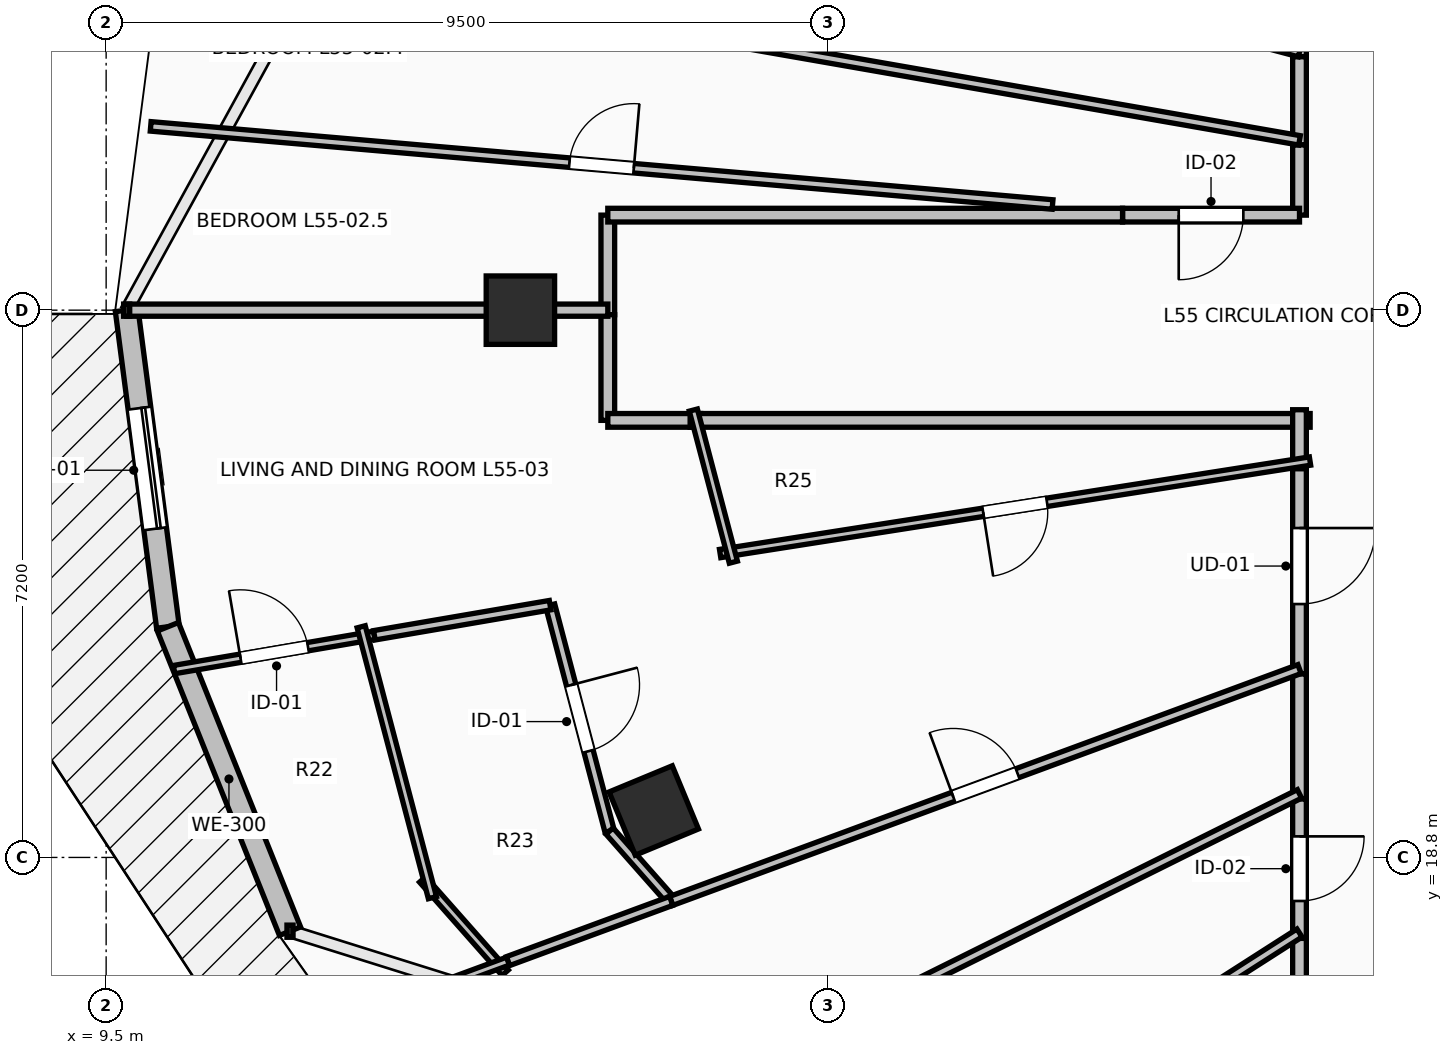
"""IFC4 building model, lengths in metres.
Left out: names, types, materials, properties, quantities, classifications, styles, units other than length and angle.
Written with IfcOpenShell. Run it as: python <this file> out.ifc"""

import sys

from ifc_helpers import new_model, si_unit, direction, frame, frame_2d, origin, origin_2d, place, context, subcontext, project, spatial, rectangle, extrude, element, fill, save


model = new_model("IFC4")
c1 = context("Model", 3, precision=1e-05, world=origin(), true_north=direction((0.0, 1.0)))
c2 = subcontext(c1, "Body", "Model", "MODEL_VIEW")
j1 = project(units=[si_unit("LENGTHUNIT", "METRE"), si_unit("PLANEANGLEUNIT", "RADIAN")], contexts=[c1])
p1 = place(None, origin())
s1 = spatial("IfcSite", under=j1, at=p1, CompositionType="ELEMENT")
p2 = place(p1, origin())
s2 = spatial("IfcBuilding", under=s1, at=p2, CompositionType="ELEMENT")
p3 = place(p2, frame((0.0, 0.0, 203.65)))
s3 = spatial("IfcBuildingStorey", under=s2, at=p3, CompositionType="ELEMENT", Elevation=203.65)
for number, where, z_axis, x_axis in (
    (1, (14.95, 26.0, 0.0), (0.0, 0.0, 1.0), (-1.0, 0.0, 0.0)),
    (2, (16.705, 19.418, 0.0), (0.0, 0.0, 1.0), (-0.924, -0.383, 0.0)),
):
    element("IfcColumn", number, at=place(p3, frame(where, z_axis=z_axis, x_axis=x_axis)), inside=s3, PredefinedType="COLUMN", context=c2, shape_type="SweptSolid", body=[
        extrude(rectangle(XDim=0.9, YDim=0.9, at=origin_2d()), origin(), (0.0, 0.0, 1.0), 3.55),
    ])
p4 = place(p3, frame((9.77, 26.0, 0.0), z_axis=(0.0, 0.0, 1.0), x_axis=(0.129147853268, -0.991625348605, 0.0)))
e3 = element("IfcWall", 3, at=p4, inside=s3, PredefinedType="STANDARD", context=c2, shape_type="SweptSolid", body=[
    extrude(rectangle(XDim=4.2, YDim=0.3, at=frame_2d((2.1, 0.0))), origin(), (0.0, 0.0, 1.0), 3.29),
])
p5 = place(p4, frame((1.3, 0.0, 0.0)))
e4 = element("IfcOpeningElement", 4, at=p5, cuts=e3, PredefinedType="OPENING", context=c2, shape_type="SweptSolid", body=[
    extrude(rectangle(XDim=1.6, YDim=2.3, at=frame_2d((0.8, 1.15))), frame((0.0, 0.165, 0.0), z_axis=(0.0, -1.0, 0.0), x_axis=(1.0, 0.0, 0.0)), (0.0, 0.0, 1.0), 0.33),
])
p6 = place(p3, frame((10.312, 21.835, 0.0), z_axis=(0.0, 0.0, 1.0), x_axis=(0.372268409848, -0.928125116043, 0.0)))
e5 = element("IfcWall", 5, at=p6, inside=s3, PredefinedType="STANDARD", context=c2, shape_type="SweptSolid", body=[
    extrude(rectangle(XDim=4.315, YDim=0.3, at=frame_2d((2.158, 0.0))), origin(), (0.0, 0.0, 1.0), 3.29),
])
p7 = place(p3, frame((25.2, 30.548, 0.0), z_axis=(0.0, 0.0, 1.0), x_axis=(0.0, -1.0, 0.0)))
e6 = element("IfcWall", 6, at=p7, inside=s3, PredefinedType="PARTITIONING", context=c2, shape_type="SweptSolid", body=[
    extrude(rectangle(XDim=1.214, YDim=0.18, at=frame_2d((0.607, 0.0))), origin(), (0.0, 0.0, 1.0), 2.482),
])
p8 = place(p3, frame((25.2, 29.334, 0.0), z_axis=(0.0, 0.0, 1.0), x_axis=(0.0, -1.0, 0.0)))
e7 = element("IfcWall", 7, at=p8, inside=s3, PredefinedType="PARTITIONING", context=c2, shape_type="SweptSolid", body=[
    extrude(rectangle(XDim=1.16, YDim=0.18, at=frame_2d((0.58, 0.0))), origin(), (0.0, 0.0, 1.0), 2.482),
])
p9 = place(p3, frame((25.2, 28.174, 0.0), z_axis=(0.0, 0.0, 1.0), x_axis=(0.0, -1.0, 0.0)))
e8 = element("IfcWall", 8, at=p9, inside=s3, PredefinedType="PARTITIONING", context=c2, shape_type="SweptSolid", body=[
    extrude(rectangle(XDim=0.924, YDim=0.18, at=frame_2d((0.462, 0.0))), origin(), (0.0, 0.0, 1.0), 2.482),
])
p10 = place(p3, frame((25.2, 27.25, 0.0), z_axis=(0.0, 0.0, 1.0), x_axis=(-1.0, 0.0, 0.0)))
e9 = element("IfcWall", 9, at=p10, inside=s3, PredefinedType="PARTITIONING", context=c2, shape_type="SweptSolid", body=[
    extrude(rectangle(XDim=2.328, YDim=0.18, at=frame_2d((1.164, 0.0))), origin(), (0.0, 0.0, 1.0), 2.482),
])
p11 = place(p10, frame((0.739, 0.0, 0.0)))
e10 = element("IfcOpeningElement", 10, at=p11, cuts=e9, PredefinedType="OPENING", context=c2, shape_type="SweptSolid", body=[
    extrude(rectangle(XDim=0.85, YDim=2.1, at=frame_2d((0.425, 1.05))), frame((0.0, 0.105, 0.0), z_axis=(0.0, -1.0, 0.0), x_axis=(1.0, 0.0, 0.0)), (0.0, 0.0, 1.0), 0.21),
])
p12 = place(p3, frame((16.1, 27.25, 0.0), z_axis=(0.0, 0.0, 1.0), x_axis=(0.0, -1.0, 0.0)))
e11 = element("IfcWall", 11, at=p12, inside=s3, PredefinedType="PARTITIONING", context=c2, shape_type="SweptSolid", body=[
    extrude(rectangle(XDim=1.31, YDim=0.18, at=frame_2d((0.655, 0.0))), origin(), (0.0, 0.0, 1.0), 2.482),
])
p13 = place(p3, frame((22.872, 27.25, 0.0), z_axis=(0.0, 0.0, 1.0), x_axis=(-1.0, 0.0, 0.0)))
e12 = element("IfcWall", 12, at=p13, inside=s3, PredefinedType="PARTITIONING", context=c2, shape_type="SweptSolid", body=[
    extrude(rectangle(XDim=6.772, YDim=0.18, at=frame_2d((3.386, 0.0))), origin(), (0.0, 0.0, 1.0), 2.482),
])
p14 = place(p3, frame((16.1, 25.94, 0.0), z_axis=(0.0, 0.0, 1.0), x_axis=(0.0, -1.0, 0.0)))
e13 = element("IfcWall", 13, at=p14, inside=s3, PredefinedType="PARTITIONING", context=c2, shape_type="SweptSolid", body=[
    extrude(rectangle(XDim=1.39, YDim=0.18, at=frame_2d((0.695, 0.0))), origin(), (0.0, 0.0, 1.0), 2.482),
])
p15 = place(p3, frame((16.1, 24.55, 0.0), z_axis=(0.0, 0.0, 1.0), x_axis=(1.0, 0.0, 0.0)))
e14 = element("IfcWall", 14, at=p15, inside=s3, PredefinedType="PARTITIONING", context=c2, shape_type="SweptSolid", body=[
    extrude(rectangle(XDim=1.223, YDim=0.18, at=frame_2d((0.611, 0.0))), origin(), (0.0, 0.0, 1.0), 3.29),
])
p16 = place(p3, frame((25.2, 24.053, 0.0), z_axis=(0.0, 0.0, 1.0), x_axis=(0.0, -1.0, 0.0)))
e15 = element("IfcWall", 15, at=p16, inside=s3, PredefinedType="PARTITIONING", context=c2, shape_type="SweptSolid", body=[
    extrude(rectangle(XDim=2.839, YDim=0.18, at=frame_2d((1.419, 0.0))), origin(), (0.0, 0.0, 1.0), 3.29),
])
p17 = place(p16, frame((0.919, 0.0, 0.0)))
e16 = element("IfcOpeningElement", 16, at=p17, cuts=e15, PredefinedType="OPENING", context=c2, shape_type="SweptSolid", body=[
    extrude(rectangle(XDim=1.0, YDim=2.15, at=frame_2d((0.5, 1.075))), frame((0.0, 0.105, 0.0), z_axis=(0.0, -1.0, 0.0), x_axis=(1.0, 0.0, 0.0)), (0.0, 0.0, 1.0), 0.21),
])
p18 = place(p3, frame((17.183, 24.55, 0.0), z_axis=(0.0, 0.0, 1.0), x_axis=(1.0, 0.0, 0.0)))
e17 = element("IfcWall", 17, at=p18, inside=s3, PredefinedType="PARTITIONING", context=c2, shape_type="SweptSolid", body=[
    extrude(rectangle(XDim=8.157, YDim=0.18, at=frame_2d((4.079, 0.0))), origin(), (0.0, 0.0, 1.0), 2.936),
])
p19 = place(p3, frame((25.2, 24.69, 0.0), z_axis=(0.0, 0.0, 1.0), x_axis=(0.0, -1.0, 0.0)))
e18 = element("IfcWall", 18, at=p19, inside=s3, PredefinedType="PARTITIONING", context=c2, shape_type="SweptSolid", body=[
    extrude(rectangle(XDim=0.777, YDim=0.18, at=frame_2d((0.388, 0.0))), origin(), (0.0, 0.0, 1.0), 3.29),
])
p20 = place(p3, frame((25.2, 21.214, 0.0), z_axis=(0.0, 0.0, 1.0), x_axis=(0.0, -1.0, 0.0)))
e19 = element("IfcWall", 19, at=p20, inside=s3, PredefinedType="PARTITIONING", context=c2, shape_type="SweptSolid", body=[
    extrude(rectangle(XDim=1.645, YDim=0.18, at=frame_2d((0.823, 0.0))), origin(), (0.0, 0.0, 1.0), 3.29),
])
p21 = place(p3, frame((25.2, 19.569, 0.0), z_axis=(0.0, 0.0, 1.0), x_axis=(0.0, -1.0, 0.0)))
e20 = element("IfcWall", 20, at=p21, inside=s3, PredefinedType="PARTITIONING", context=c2, shape_type="SweptSolid", body=[
    extrude(rectangle(XDim=1.834, YDim=0.18, at=frame_2d((0.917, 0.0))), origin(), (0.0, 0.0, 1.0), 3.29),
])
p22 = place(p21, frame((0.492, 0.0, 0.0)))
e21 = element("IfcOpeningElement", 21, at=p22, cuts=e20, PredefinedType="OPENING", context=c2, shape_type="SweptSolid", body=[
    extrude(rectangle(XDim=0.85, YDim=2.1, at=frame_2d((0.425, 1.05))), frame((0.0, 0.105, 0.0), z_axis=(0.0, -1.0, 0.0), x_axis=(1.0, 0.0, 0.0)), (0.0, 0.0, 1.0), 0.21),
])
p23 = place(p3, frame((25.2, 17.735, 0.0), z_axis=(0.0, 0.0, 1.0), x_axis=(0.0, -1.0, 0.0)))
e22 = element("IfcWall", 22, at=p23, inside=s3, PredefinedType="PARTITIONING", context=c2, shape_type="SweptSolid", body=[
    extrude(rectangle(XDim=2.108, YDim=0.18, at=frame_2d((1.054, 0.0))), origin(), (0.0, 0.0, 1.0), 2.482),
])
p24 = place(p23, frame((0.629, 0.0, 0.0)))
e23 = element("IfcOpeningElement", 23, at=p24, cuts=e22, PredefinedType="OPENING", context=c2, shape_type="SweptSolid", body=[
    extrude(rectangle(XDim=0.85, YDim=2.1, at=frame_2d((0.425, 1.05))), frame((0.0, 0.105, 0.0), z_axis=(0.0, -1.0, 0.0), x_axis=(1.0, 0.0, 0.0)), (0.0, 0.0, 1.0), 0.21),
])
p25 = place(p3, frame((11.465, 33.036, 0.0), z_axis=(0.0, 0.0, 1.0), x_axis=(0.966598137313, -0.256296782934, 0.0)))
e24 = element("IfcWall", 24, at=p25, inside=s3, PredefinedType="PARTITIONING", context=c2, shape_type="SweptSolid", body=[
    extrude(rectangle(XDim=14.209, YDim=0.125, at=frame_2d((7.105, 0.0))), origin(), (0.0, 0.0, 1.0), 2.482),
])
p26 = place(p25, frame((6.68, 0.0, 0.0)))
e25 = element("IfcOpeningElement", 25, at=p26, cuts=e24, PredefinedType="OPENING", context=c2, shape_type="SweptSolid", body=[
    extrude(rectangle(XDim=0.85, YDim=2.1, at=frame_2d((0.425, 1.05))), frame((0.0, 0.077, 0.0), z_axis=(0.0, -1.0, 0.0), x_axis=(1.0, 0.0, 0.0)), (0.0, 0.0, 1.0), 0.155),
])
p27 = place(p3, frame((10.565, 30.788, 0.0), z_axis=(0.0, 0.0, 1.0), x_axis=(0.985109541297, -0.171927867563, 0.0)))
e26 = element("IfcWall", 26, at=p27, inside=s3, PredefinedType="PARTITIONING", context=c2, shape_type="SweptSolid", body=[
    extrude(rectangle(XDim=14.856, YDim=0.125, at=frame_2d((7.428, 0.0))), origin(), (0.0, 0.0, 1.0), 2.824),
])
p28 = place(p3, frame((10.086, 28.418, 0.0), z_axis=(0.0, 0.0, 1.0), x_axis=(0.996267232338, -0.08632266081, 0.0)))
e27 = element("IfcWall", 27, at=p28, inside=s3, PredefinedType="PARTITIONING", context=c2, shape_type="SweptSolid", body=[
    extrude(rectangle(XDim=11.91, YDim=0.125, at=frame_2d((5.955, 0.0))), origin(), (0.0, 0.0, 1.0), 2.482),
])
p29 = place(p28, frame((5.53, 0.0, 0.0)))
e28 = element("IfcOpeningElement", 28, at=p29, cuts=e27, PredefinedType="OPENING", context=c2, shape_type="SweptSolid", body=[
    extrude(rectangle(XDim=0.85, YDim=2.1, at=frame_2d((0.425, 1.05))), frame((0.0, 0.077, 0.0), z_axis=(0.0, -1.0, 0.0), x_axis=(1.0, 0.0, 0.0)), (0.0, 0.0, 1.0), 0.155),
])
p30 = place(p3, frame((9.771, 26.0, 0.0), z_axis=(0.0, 0.0, 1.0), x_axis=(1.0, 0.0, 0.0)))
e29 = element("IfcWall", 29, at=p30, inside=s3, PredefinedType="PARTITIONING", context=c2, shape_type="SweptSolid", body=[
    extrude(rectangle(XDim=6.329, YDim=0.16, at=frame_2d((3.165, 0.0))), origin(), (0.0, 0.0, 1.0), 2.482),
])
p31 = place(p3, frame((25.338, 24.015, 0.0), z_axis=(0.0, 0.0, 1.0), x_axis=(-0.987940229144, -0.154835731144, 0.0)))
e30 = element("IfcWall", 30, at=p31, inside=s3, PredefinedType="PARTITIONING", context=c2, shape_type="SweptSolid", body=[
    extrude(rectangle(XDim=7.855, YDim=0.11, at=frame_2d((3.928, 0.0))), origin(), (0.0, 0.0, 1.0), 2.936),
])
p32 = place(p31, frame((3.503, 0.0, 0.0)))
e31 = element("IfcOpeningElement", 31, at=p32, cuts=e30, PredefinedType="OPENING", context=c2, shape_type="SweptSolid", body=[
    extrude(rectangle(XDim=0.85, YDim=2.1, at=frame_2d((0.425, 1.05))), frame((0.0, 0.07, 0.0), z_axis=(0.0, -1.0, 0.0), x_axis=(1.0, 0.0, 0.0)), (0.0, 0.0, 1.0), 0.14),
])
p33 = place(p3, frame((17.752, 22.685, 0.0), z_axis=(0.0, 0.0, 1.0), x_axis=(-0.254429402158, 0.967091350038, 0.0)))
e32 = element("IfcWall", 32, at=p33, inside=s3, PredefinedType="PARTITIONING", context=c2, shape_type="SweptSolid", body=[
    extrude(rectangle(XDim=2.069, YDim=0.11, at=frame_2d((1.034, 0.0))), origin(), (0.0, 0.0, 1.0), 3.29),
])
p34 = place(p3, frame((10.394, 21.271, 0.0), z_axis=(0.0, 0.0, 1.0), x_axis=(0.985656128296, 0.168766100722, 0.0)))
e33 = element("IfcWall", 33, at=p34, inside=s3, PredefinedType="PARTITIONING", context=c2, shape_type="SweptSolid", body=[
    extrude(rectangle(XDim=2.673, YDim=0.11, at=frame_2d((1.337, 0.0))), origin(), (0.0, 0.0, 1.0), 3.29),
])
p35 = place(p34, frame((0.887, 0.0, 0.0)))
e34 = element("IfcOpeningElement", 34, at=p35, cuts=e33, PredefinedType="OPENING", context=c2, shape_type="SweptSolid", body=[
    extrude(rectangle(XDim=0.9, YDim=2.1, at=frame_2d((0.45, 1.05))), frame((0.0, 0.07, 0.0), z_axis=(0.0, -1.0, 0.0), x_axis=(1.0, 0.0, 0.0)), (0.0, 0.0, 1.0), 0.14),
])
p36 = place(p3, frame((15.341, 22.119, 0.0), z_axis=(0.0, 0.0, 1.0), x_axis=(0.254462015144, -0.967082769389, 0.0)))
e35 = element("IfcWall", 35, at=p36, inside=s3, PredefinedType="PARTITIONING", context=c2, shape_type="SweptSolid", body=[
    extrude(rectangle(XDim=3.073, YDim=0.125, at=frame_2d((1.537, 0.0))), origin(), (0.0, 0.0, 1.0), 3.29),
])
p37 = place(p36, frame((1.087, 0.0, 0.0)))
e36 = element("IfcOpeningElement", 36, at=p37, cuts=e35, PredefinedType="OPENING", context=c2, shape_type="SweptSolid", body=[
    extrude(rectangle(XDim=0.9, YDim=2.1, at=frame_2d((0.45, 1.05))), frame((0.0, 0.077, 0.0), z_axis=(0.0, -1.0, 0.0), x_axis=(1.0, 0.0, 0.0)), (0.0, 0.0, 1.0), 0.155),
])
p38 = place(p3, frame((16.123, 19.147, 0.0), z_axis=(0.0, 0.0, 1.0), x_axis=(0.66171386468, -0.749756467988, 0.0)))
e37 = element("IfcWall", 37, at=p38, inside=s3, PredefinedType="PARTITIONING", context=c2, shape_type="SweptSolid", body=[
    extrude(rectangle(XDim=1.226, YDim=0.125, at=frame_2d((0.613, 0.0))), origin(), (0.0, 0.0, 1.0), 3.29),
])
p39 = place(p3, frame((13.029, 21.723, 0.0), z_axis=(0.0, 0.0, 1.0), x_axis=(0.985629682191, 0.16892048302, 0.0)))
e38 = element("IfcWall", 38, at=p39, inside=s3, PredefinedType="PARTITIONING", context=c2, shape_type="SweptSolid", body=[
    extrude(rectangle(XDim=2.346, YDim=0.125, at=frame_2d((1.173, 0.0))), origin(), (0.0, 0.0, 1.0), 3.29),
])
p40 = place(p3, frame((16.934, 18.228, 0.0), z_axis=(0.0, 0.0, 1.0), x_axis=(0.938168899516, 0.34617786755, 0.0)))
e39 = element("IfcWall", 39, at=p40, inside=s3, PredefinedType="PARTITIONING", context=c2, shape_type="SweptSolid", body=[
    extrude(rectangle(XDim=8.811, YDim=0.125, at=frame_2d((4.405, 0.0))), origin(), (0.0, 0.0, 1.0), 2.482),
])
p41 = place(p40, frame((3.955, 0.0, 0.0)))
e40 = element("IfcOpeningElement", 40, at=p41, cuts=e39, PredefinedType="OPENING", context=c2, shape_type="SweptSolid", body=[
    extrude(rectangle(XDim=0.9, YDim=2.1, at=frame_2d((0.45, 1.05))), frame((0.0, 0.077, 0.0), z_axis=(0.0, -1.0, 0.0), x_axis=(1.0, 0.0, 0.0)), (0.0, 0.0, 1.0), 0.155),
])
p42 = place(p3, frame((14.75, 17.283, 0.0), z_axis=(0.0, 0.0, 1.0), x_axis=(-0.662345628205, 0.749198417509, 0.0)))
e41 = element("IfcWall", 41, at=p42, inside=s3, PredefinedType="PARTITIONING", context=c2, shape_type="SweptSolid", body=[
    extrude(rectangle(XDim=1.639, YDim=0.11, at=frame_2d((0.819, 0.0))), origin(), (0.0, 0.0, 1.0), 3.29),
])
p43 = place(p3, frame((13.792, 18.271, 0.0), z_axis=(0.0, 0.0, 1.0), x_axis=(-0.254271540361, 0.967132867688, 0.0)))
e42 = element("IfcWall", 42, at=p43, inside=s3, PredefinedType="PARTITIONING", context=c2, shape_type="SweptSolid", body=[
    extrude(rectangle(XDim=3.685, YDim=0.11, at=frame_2d((1.843, 0.0))), origin(), (0.0, 0.0, 1.0), 3.29),
])
p44 = place(p3, frame((12.604, 16.631, 0.0), z_axis=(0.0, 0.0, 1.0), x_axis=(0.938194450562, 0.346108614361, 0.0)))
e43 = element("IfcWall", 43, at=p44, inside=s3, PredefinedType="PARTITIONING", context=c2, shape_type="SweptSolid", body=[
    extrude(rectangle(XDim=2.328, YDim=0.11, at=frame_2d((1.164, 0.0))), origin(), (0.0, 0.0, 1.0), 3.29),
])
p45 = place(p3, frame((14.788, 17.436, 0.0), z_axis=(0.0, 0.0, 1.0), x_axis=(0.938171690747, 0.346170303003, 0.0)))
e44 = element("IfcWall", 44, at=p45, inside=s3, PredefinedType="PARTITIONING", context=c2, shape_type="SweptSolid", body=[
    extrude(rectangle(XDim=2.287, YDim=0.125, at=frame_2d((1.144, 0.0))), origin(), (0.0, 0.0, 1.0), 3.29),
])
p46 = place(p3, frame((14.428, 14.28, 0.0), z_axis=(0.0, 0.0, 1.0), x_axis=(0.895423439435, 0.44521552546, 0.0)))
e45 = element("IfcWall", 45, at=p46, inside=s3, PredefinedType="PARTITIONING", context=c2, shape_type="SweptSolid", body=[
    extrude(rectangle(XDim=12.03, YDim=0.125, at=frame_2d((6.015, 0.0))), origin(), (0.0, 0.0, 1.0), 2.482),
])
p47 = place(p3, frame((16.555, 12.272, 0.0), z_axis=(0.0, 0.0, 1.0), x_axis=(0.842221721565, 0.539131312135, 0.0)))
e46 = element("IfcWall", 46, at=p47, inside=s3, PredefinedType="PARTITIONING", context=c2, shape_type="SweptSolid", body=[
    extrude(rectangle(XDim=10.265, YDim=0.125, at=frame_2d((5.132, 0.0))), origin(), (0.0, 0.0, 1.0), 2.482),
])
p48 = place(p5, origin())
e47 = element("IfcDoor", 47, at=p48, inside=s3, OperationType="SLIDING_TO_LEFT", PredefinedType="DOOR", context=c2, shape_type="SweptSolid", body=[
    extrude(rectangle(XDim=1.6, YDim=2.3, at=frame_2d((0.8, 1.15))), frame((0.0, 0.025, 0.0), z_axis=(0.0, -1.0, 0.0), x_axis=(1.0, 0.0, 0.0)), (0.0, 0.0, 1.0), 0.05),
])
fill(e4, e47)
p49 = place(p17, origin())
e48 = element("IfcDoor", 48, at=p49, inside=s3, OperationType="SINGLE_SWING_LEFT", PredefinedType="DOOR", context=c2, shape_type="SweptSolid", body=[
    extrude(rectangle(XDim=1.0, YDim=2.15, at=frame_2d((0.5, 1.075))), frame((0.0, 0.025, 0.0), z_axis=(0.0, -1.0, 0.0), x_axis=(1.0, 0.0, 0.0)), (0.0, 0.0, 1.0), 0.05),
])
fill(e16, e48)
p50 = place(p32, origin())
e49 = element("IfcDoor", 49, at=p50, inside=s3, OperationType="SINGLE_SWING_RIGHT", PredefinedType="DOOR", context=c2, shape_type="SweptSolid", body=[
    extrude(rectangle(XDim=0.85, YDim=2.1, at=frame_2d((0.425, 1.05))), frame((0.0, 0.025, 0.0), z_axis=(0.0, -1.0, 0.0), x_axis=(1.0, 0.0, 0.0)), (0.0, 0.0, 1.0), 0.05),
])
fill(e31, e49)
p51 = place(p35, origin())
e50 = element("IfcDoor", 50, at=p51, inside=s3, OperationType="SINGLE_SWING_LEFT", PredefinedType="DOOR", context=c2, shape_type="SweptSolid", body=[
    extrude(rectangle(XDim=0.9, YDim=2.1, at=frame_2d((0.45, 1.05))), frame((0.0, 0.025, 0.0), z_axis=(0.0, -1.0, 0.0), x_axis=(1.0, 0.0, 0.0)), (0.0, 0.0, 1.0), 0.05),
])
fill(e34, e50)
p52 = place(p37, origin())
e51 = element("IfcDoor", 51, at=p52, inside=s3, OperationType="SINGLE_SWING_LEFT", PredefinedType="DOOR", context=c2, shape_type="SweptSolid", body=[
    extrude(rectangle(XDim=0.9, YDim=2.1, at=frame_2d((0.45, 1.05))), frame((0.0, 0.025, 0.0), z_axis=(0.0, -1.0, 0.0), x_axis=(1.0, 0.0, 0.0)), (0.0, 0.0, 1.0), 0.05),
])
fill(e36, e51)
p53 = place(p41, origin())
e52 = element("IfcDoor", 52, at=p53, inside=s3, OperationType="SINGLE_SWING_LEFT", PredefinedType="DOOR", context=c2, shape_type="SweptSolid", body=[
    extrude(rectangle(XDim=0.9, YDim=2.1, at=frame_2d((0.45, 1.05))), frame((0.0, 0.025, 0.0), z_axis=(0.0, -1.0, 0.0), x_axis=(1.0, 0.0, 0.0)), (0.0, 0.0, 1.0), 0.05),
])
fill(e40, e52)
p54 = place(p11, origin())
e53 = element("IfcDoor", 53, at=p54, inside=s3, OperationType="SINGLE_SWING_RIGHT", PredefinedType="DOOR", context=c2, shape_type="SweptSolid", body=[
    extrude(rectangle(XDim=0.85, YDim=2.1, at=frame_2d((0.425, 1.05))), frame((0.0, 0.025, 0.0), z_axis=(0.0, -1.0, 0.0), x_axis=(1.0, 0.0, 0.0)), (0.0, 0.0, 1.0), 0.05),
])
fill(e10, e53)
p55 = place(p22, origin())
e54 = element("IfcDoor", 54, at=p55, inside=s3, OperationType="SINGLE_SWING_LEFT", PredefinedType="DOOR", context=c2, shape_type="SweptSolid", body=[
    extrude(rectangle(XDim=0.85, YDim=2.1, at=frame_2d((0.425, 1.05))), frame((0.0, 0.025, 0.0), z_axis=(0.0, -1.0, 0.0), x_axis=(1.0, 0.0, 0.0)), (0.0, 0.0, 1.0), 0.05),
])
fill(e21, e54)
p56 = place(p29, origin())
e55 = element("IfcDoor", 55, at=p56, inside=s3, OperationType="SINGLE_SWING_RIGHT", PredefinedType="DOOR", context=c2, shape_type="SweptSolid", body=[
    extrude(rectangle(XDim=0.85, YDim=2.1, at=frame_2d((0.425, 1.05))), frame((0.0, 0.025, 0.0), z_axis=(0.0, -1.0, 0.0), x_axis=(1.0, 0.0, 0.0)), (0.0, 0.0, 1.0), 0.05),
])
fill(e28, e55)
save(model, sys.argv[1])
